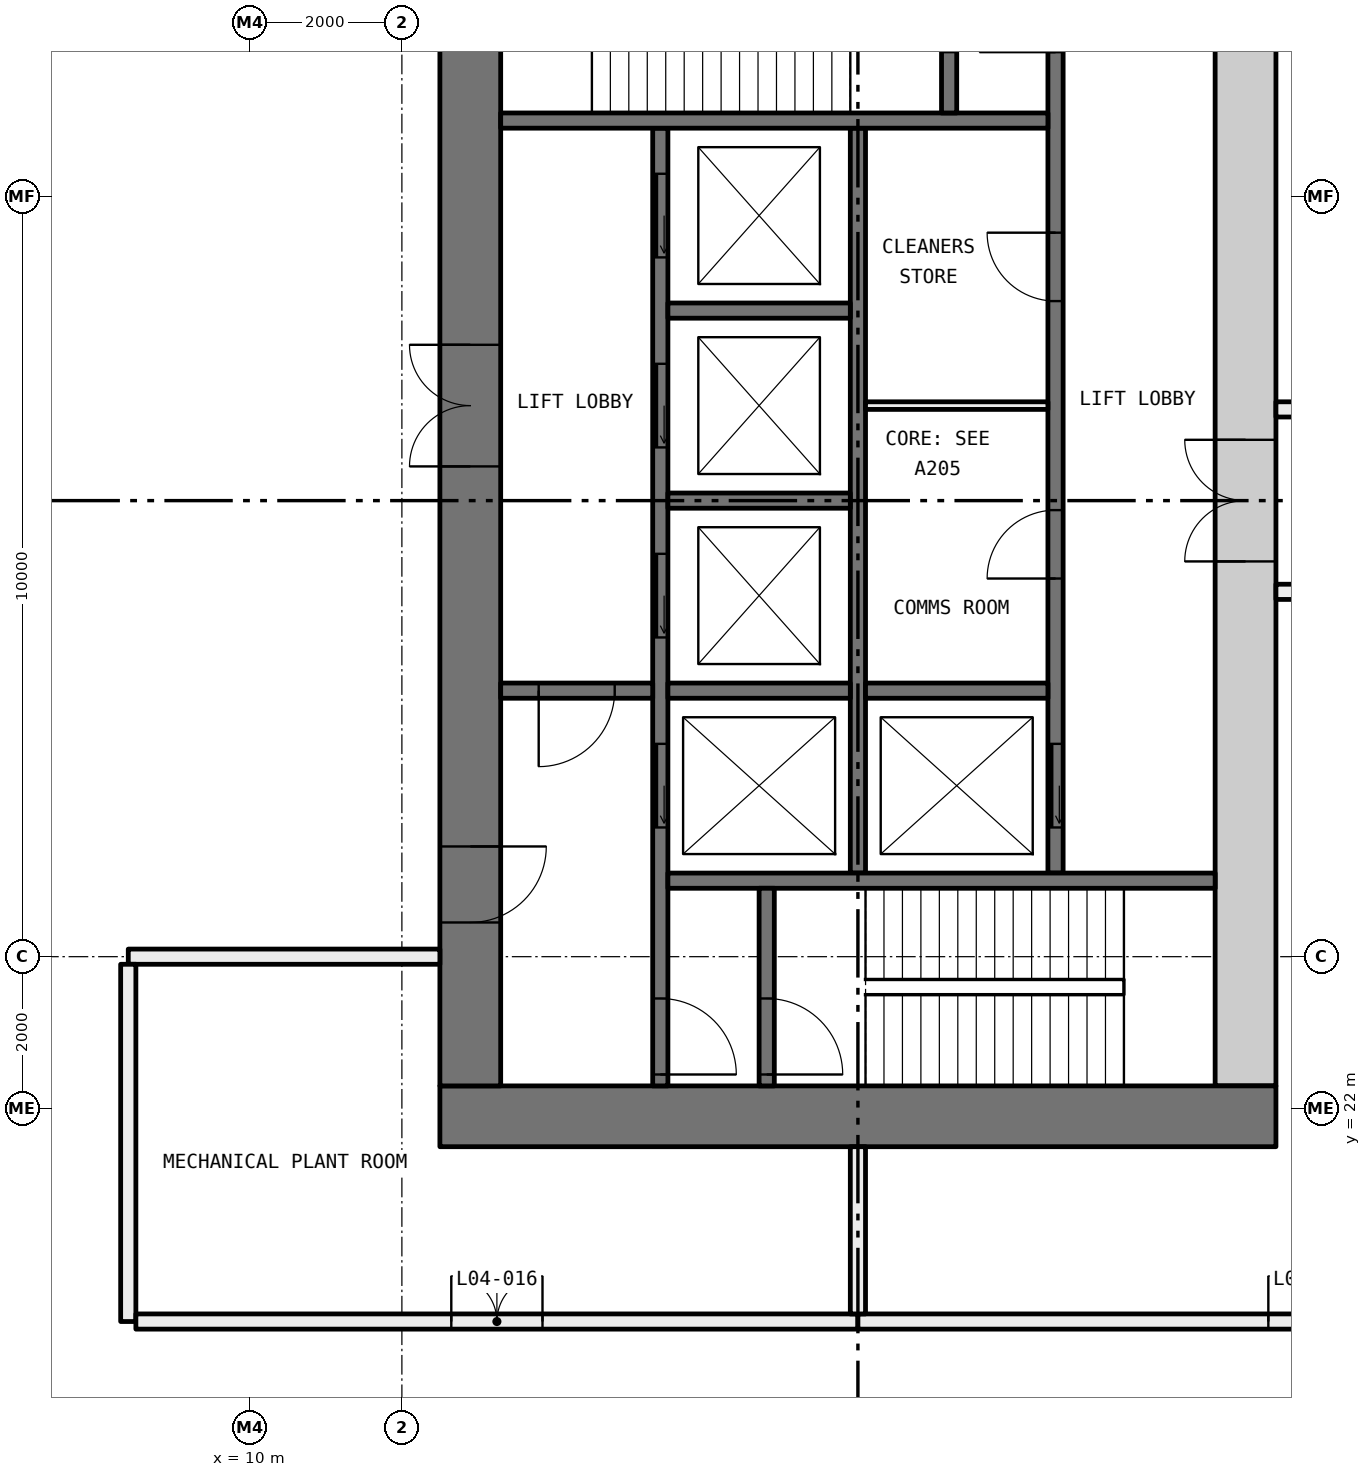
"""IFC4 building model, lengths in metres.
Left out: names, types, materials, properties, quantities, classifications, styles, units other than length and angle.
Written with IfcOpenShell. Run it as: python <this file> out.ifc"""

import sys

from ifc_helpers import new_model, si_unit, direction, frame, frame_2d, origin, place, context, subcontext, project, spatial, rectangle, extrude, element, fill, save


model = new_model("IFC4")
c1 = context("Model", 3, precision=1e-05, world=origin(), true_north=direction((0.0, 1.0)))
c2 = subcontext(c1, "Body", "Model", "MODEL_VIEW")
j1 = project(units=[si_unit("LENGTHUNIT", "METRE"), si_unit("PLANEANGLEUNIT", "RADIAN")], contexts=[c1])
p1 = place(None, origin())
s1 = spatial("IfcSite", under=j1, at=p1, CompositionType="ELEMENT")
p2 = place(p1, origin())
s2 = spatial("IfcBuilding", under=s1, at=p2, CompositionType="ELEMENT")
p3 = place(p2, frame((0.0, 0.0, 24.0)))
s3 = spatial("IfcBuildingStorey", under=s2, at=p3, CompositionType="ELEMENT", Elevation=24.0)
p4 = place(p3, frame((12.5, 24.0, 0.0), z_axis=(0.0, 0.0, 1.0), x_axis=(-1.0, 0.0, 0.0)))
e1 = element("IfcWall", 1, at=p4, inside=s3, PredefinedType="PARTITIONING", context=c2, shape_type="SweptSolid", body=[
    extrude(rectangle(XDim=4.1, YDim=0.2, at=frame_2d((2.05, 0.0))), origin(), (0.0, 0.0, 1.0), 5.0),
])
p5 = place(p3, frame((8.4, 23.9, 0.0), z_axis=(0.0, 0.0, 1.0), x_axis=(0.0, -1.0, 0.0)))
e2 = element("IfcWall", 2, at=p5, inside=s3, PredefinedType="PARTITIONING", context=c2, shape_type="SweptSolid", body=[
    extrude(rectangle(XDim=4.7, YDim=0.2, at=frame_2d((2.35, 0.0))), origin(), (0.0, 0.0, 1.0), 5.6),
])
p6 = place(p3, frame((8.5, 19.2, 0.0), z_axis=(0.0, 0.0, 1.0), x_axis=(1.0, 0.0, 0.0)))
e3 = element("IfcWall", 3, at=p6, inside=s3, PredefinedType="PARTITIONING", context=c2, shape_type="SweptSolid", body=[
    extrude(rectangle(XDim=9.5, YDim=0.2, at=frame_2d((4.75, 0.0))), origin(), (0.0, 0.0, 1.0), 5.6),
])
p7 = place(p6, frame((4.15, 0.0, 0.0)))
e4 = element("IfcOpeningElement", 4, at=p7, cuts=e3, PredefinedType="OPENING", context=c2, shape_type="SweptSolid", body=[
    extrude(rectangle(XDim=1.2, YDim=2.1, at=frame_2d((0.6, 1.05))), frame((0.0, 0.11, 0.0), z_axis=(0.0, -1.0, 0.0), x_axis=(1.0, 0.0, 0.0)), (0.0, 0.0, 1.0), 0.22),
])
p8 = place(p3, frame((18.0, 19.2, 0.0), z_axis=(0.0, 0.0, 1.0), x_axis=(1.0, 0.0, 0.0)))
e5 = element("IfcWall", 5, at=p8, inside=s3, PredefinedType="PARTITIONING", context=c2, shape_type="SweptSolid", body=[
    extrude(rectangle(XDim=12.0, YDim=0.2, at=frame_2d((6.0, 0.0))), origin(), (0.0, 0.0, 1.0), 5.6),
])
p9 = place(p8, frame((5.4, 0.0, 0.0)))
e6 = element("IfcOpeningElement", 6, at=p9, cuts=e5, PredefinedType="OPENING", context=c2, shape_type="SweptSolid", body=[
    extrude(rectangle(XDim=1.2, YDim=2.1, at=frame_2d((0.6, 1.05))), frame((0.0, 0.11, 0.0), z_axis=(0.0, -1.0, 0.0), x_axis=(1.0, 0.0, 0.0)), (0.0, 0.0, 1.0), 0.22),
])
p10 = place(p3, frame((23.5, 28.8, 0.0), z_axis=(0.0, 0.0, 1.0), x_axis=(1.0, 0.0, 0.0)))
e7 = element("IfcWall", 7, at=p10, inside=s3, PredefinedType="PARTITIONING", context=c2, shape_type="SweptSolid", body=[
    extrude(rectangle(XDim=6.5, YDim=0.2, at=frame_2d((3.25, 0.0))), origin(), (0.0, 0.0, 1.0), 5.6),
])
p11 = place(p10, frame((2.65, 0.0, 0.0)))
e8 = element("IfcOpeningElement", 8, at=p11, cuts=e7, PredefinedType="OPENING", context=c2, shape_type="SweptSolid", body=[
    extrude(rectangle(XDim=1.2, YDim=2.1, at=frame_2d((0.6, 1.05))), frame((0.0, 0.11, 0.0), z_axis=(0.0, -1.0, 0.0), x_axis=(1.0, 0.0, 0.0)), (0.0, 0.0, 1.0), 0.22),
])
p12 = place(p3, frame((30.0, 31.2, 0.0), z_axis=(0.0, 0.0, 1.0), x_axis=(-1.0, 0.0, 0.0)))
e9 = element("IfcWall", 9, at=p12, inside=s3, PredefinedType="PARTITIONING", context=c2, shape_type="SweptSolid", body=[
    extrude(rectangle(XDim=6.5, YDim=0.2, at=frame_2d((3.25, 0.0))), origin(), (0.0, 0.0, 1.0), 5.6),
])
p13 = place(p12, frame((2.65, 0.0, 0.0)))
e10 = element("IfcOpeningElement", 10, at=p13, cuts=e9, PredefinedType="OPENING", context=c2, shape_type="SweptSolid", body=[
    extrude(rectangle(XDim=1.2, YDim=2.1, at=frame_2d((0.6, 1.05))), frame((0.0, 0.11, 0.0), z_axis=(0.0, -1.0, 0.0), x_axis=(1.0, 0.0, 0.0)), (0.0, 0.0, 1.0), 0.22),
])
p14 = place(p3, frame((18.0, 19.3, 0.0), z_axis=(0.0, 0.0, 1.0), x_axis=(0.0, 1.0, 0.0)))
e11 = element("IfcWall", 11, at=p14, inside=s3, PredefinedType="PARTITIONING", context=c2, shape_type="SweptSolid", body=[
    extrude(rectangle(XDim=2.2, YDim=0.2, at=frame_2d((1.1, 0.0))), origin(), (0.0, 0.0, 1.0), 5.6),
])
p15 = place(p3, frame((12.5, 21.9, 0.0), z_axis=(0.0, 0.0, 1.0), x_axis=(1.0, 0.0, 0.0)))
e12 = element("IfcWall", 12, at=p15, inside=s3, PredefinedType="SHEAR", context=c2, shape_type="SweptSolid", body=[
    extrude(rectangle(XDim=11.0, YDim=0.8, at=frame_2d((5.5, 0.0))), origin(), (0.0, 0.0, 1.0), 5.6),
])
p16 = place(p3, frame((12.9, 22.3, 0.0), z_axis=(0.0, 0.0, 1.0), x_axis=(0.0, 1.0, 0.0)))
e13 = element("IfcWall", 13, at=p16, inside=s3, PredefinedType="SHEAR", context=c2, shape_type="SweptSolid", body=[
    extrude(rectangle(XDim=15.4, YDim=0.8, at=frame_2d((7.7, 0.0))), origin(), (0.0, 0.0, 1.0), 5.6),
])
p17 = place(p16, frame((8.15, 0.0, 0.0)))
e14 = element("IfcOpeningElement", 14, at=p17, cuts=e13, PredefinedType="OPENING", context=c2, shape_type="SweptSolid", body=[
    extrude(rectangle(XDim=1.6, YDim=2.1, at=frame_2d((0.8, 1.05))), frame((0.0, 0.41, 0.0), z_axis=(0.0, -1.0, 0.0), x_axis=(1.0, 0.0, 0.0)), (0.0, 0.0, 1.0), 0.82),
])
p18 = place(p16, frame((2.15, 0.0, 0.0)))
e15 = element("IfcOpeningElement", 15, at=p18, cuts=e13, PredefinedType="OPENING", context=c2, shape_type="SweptSolid", body=[
    extrude(rectangle(XDim=1.0, YDim=2.1, at=frame_2d((0.5, 1.05))), frame((0.0, 0.41, 0.0), z_axis=(0.0, -1.0, 0.0), x_axis=(1.0, 0.0, 0.0)), (0.0, 0.0, 1.0), 0.82),
])
p19 = place(p3, frame((23.1, 22.3, 0.0), z_axis=(0.0, 0.0, 1.0), x_axis=(0.0, 1.0, 0.0)))
e16 = element("IfcWall", 16, at=p19, inside=s3, PredefinedType="SHEAR", context=c2, shape_type="SweptSolid", body=[
    extrude(rectangle(XDim=15.4, YDim=0.8, at=frame_2d((7.7, 0.0))), origin(), (0.0, 0.0, 1.0), 5.6),
])
p20 = place(p19, frame((6.9, 0.0, 0.0)))
e17 = element("IfcOpeningElement", 17, at=p20, cuts=e16, PredefinedType="OPENING", context=c2, shape_type="SweptSolid", body=[
    extrude(rectangle(XDim=1.6, YDim=2.1, at=frame_2d((0.8, 1.05))), frame((0.0, 0.41, 0.0), z_axis=(0.0, -1.0, 0.0), x_axis=(1.0, 0.0, 0.0)), (0.0, 0.0, 1.0), 0.82),
])
p21 = place(p3, frame((15.4, 22.3, 0.0), z_axis=(0.0, 0.0, 1.0), x_axis=(0.0, 1.0, 0.0)))
e18 = element("IfcWall", 18, at=p21, inside=s3, PredefinedType="SOLIDWALL", context=c2, shape_type="SweptSolid", body=[
    extrude(rectangle(XDim=12.6, YDim=0.2, at=frame_2d((6.3, 0.0))), origin(), (0.0, 0.0, 1.0), 5.6),
])
p22 = place(p21, frame((3.4, 0.0, 0.0)))
e19 = element("IfcOpeningElement", 19, at=p22, cuts=e18, PredefinedType="OPENING", context=c2, shape_type="SweptSolid", body=[
    extrude(rectangle(XDim=1.1, YDim=2.1, at=frame_2d((0.55, 1.05))), frame((0.0, 0.11, 0.0), z_axis=(0.0, -1.0, 0.0), x_axis=(1.0, 0.0, 0.0)), (0.0, 0.0, 1.0), 0.22),
])
p23 = place(p21, frame((5.9, 0.0, 0.0)))
e20 = element("IfcOpeningElement", 20, at=p23, cuts=e18, PredefinedType="OPENING", context=c2, shape_type="SweptSolid", body=[
    extrude(rectangle(XDim=1.1, YDim=2.1, at=frame_2d((0.55, 1.05))), frame((0.0, 0.11, 0.0), z_axis=(0.0, -1.0, 0.0), x_axis=(1.0, 0.0, 0.0)), (0.0, 0.0, 1.0), 0.22),
])
p24 = place(p21, frame((8.4, 0.0, 0.0)))
e21 = element("IfcOpeningElement", 21, at=p24, cuts=e18, PredefinedType="OPENING", context=c2, shape_type="SweptSolid", body=[
    extrude(rectangle(XDim=1.1, YDim=2.1, at=frame_2d((0.55, 1.05))), frame((0.0, 0.11, 0.0), z_axis=(0.0, -1.0, 0.0), x_axis=(1.0, 0.0, 0.0)), (0.0, 0.0, 1.0), 0.22),
])
p25 = place(p21, frame((10.9, 0.0, 0.0)))
e22 = element("IfcOpeningElement", 22, at=p25, cuts=e18, PredefinedType="OPENING", context=c2, shape_type="SweptSolid", body=[
    extrude(rectangle(XDim=1.1, YDim=2.1, at=frame_2d((0.55, 1.05))), frame((0.0, 0.11, 0.0), z_axis=(0.0, -1.0, 0.0), x_axis=(1.0, 0.0, 0.0)), (0.0, 0.0, 1.0), 0.22),
])
p26 = place(p21, frame((0.15, 0.0, 0.0)))
e23 = element("IfcOpeningElement", 23, at=p26, cuts=e18, PredefinedType="OPENING", context=c2, shape_type="SweptSolid", body=[
    extrude(rectangle(XDim=1.0, YDim=2.1, at=frame_2d((0.5, 1.05))), frame((0.0, 0.11, 0.0), z_axis=(0.0, -1.0, 0.0), x_axis=(1.0, 0.0, 0.0)), (0.0, 0.0, 1.0), 0.22),
])
p27 = place(p3, frame((20.6, 25.1, 0.0), z_axis=(0.0, 0.0, 1.0), x_axis=(0.0, 1.0, 0.0)))
e24 = element("IfcWall", 24, at=p27, inside=s3, PredefinedType="SOLIDWALL", context=c2, shape_type="SweptSolid", body=[
    extrude(rectangle(XDim=12.6, YDim=0.2, at=frame_2d((6.3, 0.0))), origin(), (0.0, 0.0, 1.0), 5.6),
])
p28 = place(p27, frame((0.6, 0.0, 0.0)))
e25 = element("IfcOpeningElement", 25, at=p28, cuts=e24, PredefinedType="OPENING", context=c2, shape_type="SweptSolid", body=[
    extrude(rectangle(XDim=1.1, YDim=2.1, at=frame_2d((0.55, 1.05))), frame((0.0, 0.11, 0.0), z_axis=(0.0, -1.0, 0.0), x_axis=(1.0, 0.0, 0.0)), (0.0, 0.0, 1.0), 0.22),
])
p29 = place(p27, frame((10.8, 0.0, 0.0)))
e26 = element("IfcOpeningElement", 26, at=p29, cuts=e24, PredefinedType="OPENING", context=c2, shape_type="SweptSolid", body=[
    extrude(rectangle(XDim=1.0, YDim=2.1, at=frame_2d((0.5, 1.05))), frame((0.0, 0.11, 0.0), z_axis=(0.0, -1.0, 0.0), x_axis=(1.0, 0.0, 0.0)), (0.0, 0.0, 1.0), 0.22),
])
p30 = place(p27, frame((3.875, 0.0, 0.0)))
e27 = element("IfcOpeningElement", 27, at=p30, cuts=e24, PredefinedType="OPENING", context=c2, shape_type="SweptSolid", body=[
    extrude(rectangle(XDim=0.9, YDim=2.1, at=frame_2d((0.45, 1.05))), frame((0.0, 0.11, 0.0), z_axis=(0.0, -1.0, 0.0), x_axis=(1.0, 0.0, 0.0)), (0.0, 0.0, 1.0), 0.22),
])
p31 = place(p27, frame((7.525, 0.0, 0.0)))
e28 = element("IfcOpeningElement", 28, at=p31, cuts=e24, PredefinedType="OPENING", context=c2, shape_type="SweptSolid", body=[
    extrude(rectangle(XDim=0.9, YDim=2.1, at=frame_2d((0.45, 1.05))), frame((0.0, 0.11, 0.0), z_axis=(0.0, -1.0, 0.0), x_axis=(1.0, 0.0, 0.0)), (0.0, 0.0, 1.0), 0.22),
])
p32 = place(p3, frame((18.0, 25.1, 0.0), z_axis=(0.0, 0.0, 1.0), x_axis=(0.0, 1.0, 0.0)))
e29 = element("IfcWall", 29, at=p32, inside=s3, PredefinedType="SOLIDWALL", context=c2, shape_type="SweptSolid", body=[
    extrude(rectangle(XDim=9.8, YDim=0.2, at=frame_2d((4.9, 0.0))), origin(), (0.0, 0.0, 1.0), 5.6),
])
for number, where, z_axis, x_axis in (
    (30, (15.5, 25.0, 0.0), (0.0, 0.0, 1.0), (1.0, 0.0, 0.0)),
    (31, (13.3, 35.0, 0.0), (0.0, 0.0, 1.0), (1.0, 0.0, 0.0)),
):
    element("IfcWall", number, at=place(p3, frame(where, z_axis=z_axis, x_axis=x_axis)), inside=s3, PredefinedType="SOLIDWALL", context=c2, shape_type="SweptSolid", body=[
        extrude(rectangle(XDim=7.2, YDim=0.2, at=frame_2d((3.6, 0.0))), origin(), (0.0, 0.0, 1.0), 5.6),
    ])
p33 = place(p3, frame((13.3, 27.5, 0.0), z_axis=(0.0, 0.0, 1.0), x_axis=(1.0, 0.0, 0.0)))
e32 = element("IfcWall", 32, at=p33, inside=s3, PredefinedType="SOLIDWALL", context=c2, shape_type="SweptSolid", body=[
    extrude(rectangle(XDim=2.0, YDim=0.2, at=frame_2d((1.0, 0.0))), origin(), (0.0, 0.0, 1.0), 5.6),
])
p34 = place(p33, frame((0.5, 0.0, 0.0)))
e33 = element("IfcOpeningElement", 33, at=p34, cuts=e32, PredefinedType="OPENING", context=c2, shape_type="SweptSolid", body=[
    extrude(rectangle(XDim=1.0, YDim=2.1, at=frame_2d((0.5, 1.05))), frame((0.0, 0.11, 0.0), z_axis=(0.0, -1.0, 0.0), x_axis=(1.0, 0.0, 0.0)), (0.0, 0.0, 1.0), 0.22),
])
p35 = place(p3, frame((16.8, 22.3, 0.0), z_axis=(0.0, 0.0, 1.0), x_axis=(0.0, 1.0, 0.0)))
e34 = element("IfcWall", 34, at=p35, inside=s3, PredefinedType="SOLIDWALL", context=c2, shape_type="SweptSolid", body=[
    extrude(rectangle(XDim=2.6, YDim=0.2, at=frame_2d((1.3, 0.0))), origin(), (0.0, 0.0, 1.0), 5.6),
])
p36 = place(p35, frame((0.15, 0.0, 0.0)))
e35 = element("IfcOpeningElement", 35, at=p36, cuts=e34, PredefinedType="OPENING", context=c2, shape_type="SweptSolid", body=[
    extrude(rectangle(XDim=1.0, YDim=2.1, at=frame_2d((0.5, 1.05))), frame((0.0, 0.11, 0.0), z_axis=(0.0, -1.0, 0.0), x_axis=(1.0, 0.0, 0.0)), (0.0, 0.0, 1.0), 0.22),
])
p37 = place(p3, frame((19.2, 35.1, 0.0), z_axis=(0.0, 0.0, 1.0), x_axis=(0.0, 1.0, 0.0)))
e36 = element("IfcWall", 36, at=p37, inside=s3, PredefinedType="SOLIDWALL", context=c2, shape_type="SweptSolid", body=[
    extrude(rectangle(XDim=2.6, YDim=0.2, at=frame_2d((1.3, 0.0))), origin(), (0.0, 0.0, 1.0), 5.6),
])
p38 = place(p37, frame((0.8, 0.0, 0.0)))
e37 = element("IfcOpeningElement", 37, at=p38, cuts=e36, PredefinedType="OPENING", context=c2, shape_type="SweptSolid", body=[
    extrude(rectangle(XDim=1.0, YDim=2.1, at=frame_2d((0.5, 1.05))), frame((0.0, 0.11, 0.0), z_axis=(0.0, -1.0, 0.0), x_axis=(1.0, 0.0, 0.0)), (0.0, 0.0, 1.0), 0.22),
])
for number, where, z_axis, x_axis in (
    (38, (15.5, 27.5, 0.0), (0.0, 0.0, 1.0), (1.0, 0.0, 0.0)),
    (39, (15.5, 30.0, 0.0), (0.0, 0.0, 1.0), (1.0, 0.0, 0.0)),
    (40, (15.5, 32.5, 0.0), (0.0, 0.0, 1.0), (1.0, 0.0, 0.0)),
    (41, (18.1, 27.5, 0.0), (0.0, 0.0, 1.0), (1.0, 0.0, 0.0)),
):
    element("IfcWall", number, at=place(p3, frame(where, z_axis=z_axis, x_axis=x_axis)), inside=s3, PredefinedType="SOLIDWALL", context=c2, shape_type="SweptSolid", body=[
        extrude(rectangle(XDim=2.4, YDim=0.2, at=frame_2d((1.2, 0.0))), origin(), (0.0, 0.0, 1.0), 5.6),
    ])
p39 = place(p3, frame((18.1, 31.25, 0.0), z_axis=(0.0, 0.0, 1.0), x_axis=(1.0, 0.0, 0.0)))
e42 = element("IfcWall", 42, at=p39, inside=s3, PredefinedType="PARTITIONING", context=c2, shape_type="SweptSolid", body=[
    extrude(rectangle(XDim=2.4, YDim=0.1, at=frame_2d((1.2, 0.0))), origin(), (0.0, 0.0, 1.0), 5.6),
])
p40 = place(p7, origin())
e43 = element("IfcDoor", 43, at=p40, inside=s3, OperationType="DOUBLE_DOOR_SINGLE_SWING", PredefinedType="DOOR", context=c2, shape_type="SweptSolid", body=[
    extrude(rectangle(XDim=1.2, YDim=2.1, at=frame_2d((0.6, 1.05))), frame((0.0, 0.025, 0.0), z_axis=(0.0, -1.0, 0.0), x_axis=(1.0, 0.0, 0.0)), (0.0, 0.0, 1.0), 0.05),
])
fill(e4, e43)
p41 = place(p9, origin())
e44 = element("IfcDoor", 44, at=p41, inside=s3, OperationType="DOUBLE_DOOR_SINGLE_SWING", PredefinedType="DOOR", context=c2, shape_type="SweptSolid", body=[
    extrude(rectangle(XDim=1.2, YDim=2.1, at=frame_2d((0.6, 1.05))), frame((0.0, 0.025, 0.0), z_axis=(0.0, -1.0, 0.0), x_axis=(1.0, 0.0, 0.0)), (0.0, 0.0, 1.0), 0.05),
])
fill(e6, e44)
p42 = place(p28, origin())
e45 = element("IfcDoor", 45, at=p42, inside=s3, OperationType="SLIDING_TO_LEFT", PredefinedType="DOOR", context=c2, shape_type="SweptSolid", body=[
    extrude(rectangle(XDim=1.1, YDim=2.1, at=frame_2d((0.55, 1.05))), frame((0.0, 0.025, 0.0), z_axis=(0.0, -1.0, 0.0), x_axis=(1.0, 0.0, 0.0)), (0.0, 0.0, 1.0), 0.05),
])
fill(e25, e45)
p43 = place(p22, origin())
e46 = element("IfcDoor", 46, at=p43, inside=s3, OperationType="SLIDING_TO_LEFT", PredefinedType="DOOR", context=c2, shape_type="SweptSolid", body=[
    extrude(rectangle(XDim=1.1, YDim=2.1, at=frame_2d((0.55, 1.05))), frame((0.0, 0.025, 0.0), z_axis=(0.0, -1.0, 0.0), x_axis=(1.0, 0.0, 0.0)), (0.0, 0.0, 1.0), 0.05),
])
fill(e19, e46)
p44 = place(p23, origin())
e47 = element("IfcDoor", 47, at=p44, inside=s3, OperationType="SLIDING_TO_LEFT", PredefinedType="DOOR", context=c2, shape_type="SweptSolid", body=[
    extrude(rectangle(XDim=1.1, YDim=2.1, at=frame_2d((0.55, 1.05))), frame((0.0, 0.025, 0.0), z_axis=(0.0, -1.0, 0.0), x_axis=(1.0, 0.0, 0.0)), (0.0, 0.0, 1.0), 0.05),
])
fill(e20, e47)
p45 = place(p24, origin())
e48 = element("IfcDoor", 48, at=p45, inside=s3, OperationType="SLIDING_TO_LEFT", PredefinedType="DOOR", context=c2, shape_type="SweptSolid", body=[
    extrude(rectangle(XDim=1.1, YDim=2.1, at=frame_2d((0.55, 1.05))), frame((0.0, 0.025, 0.0), z_axis=(0.0, -1.0, 0.0), x_axis=(1.0, 0.0, 0.0)), (0.0, 0.0, 1.0), 0.05),
])
fill(e21, e48)
p46 = place(p25, origin())
e49 = element("IfcDoor", 49, at=p46, inside=s3, OperationType="SLIDING_TO_LEFT", PredefinedType="DOOR", context=c2, shape_type="SweptSolid", body=[
    extrude(rectangle(XDim=1.1, YDim=2.1, at=frame_2d((0.55, 1.05))), frame((0.0, 0.025, 0.0), z_axis=(0.0, -1.0, 0.0), x_axis=(1.0, 0.0, 0.0)), (0.0, 0.0, 1.0), 0.05),
])
fill(e22, e49)
p47 = place(p36, frame((1.0, 0.0, 0.0), x_axis=(-1.0, 0.0, 0.0)))
e50 = element("IfcDoor", 50, at=p47, inside=s3, OperationType="SINGLE_SWING_LEFT", PredefinedType="DOOR", context=c2, shape_type="SweptSolid", body=[
    extrude(rectangle(XDim=1.0, YDim=2.1, at=frame_2d((0.5, 1.05))), frame((0.0, 0.025, 0.0), z_axis=(0.0, -1.0, 0.0), x_axis=(1.0, 0.0, 0.0)), (0.0, 0.0, 1.0), 0.05),
])
fill(e35, e50)
p48 = place(p26, frame((1.0, 0.0, 0.0), x_axis=(-1.0, 0.0, 0.0)))
e51 = element("IfcDoor", 51, at=p48, inside=s3, OperationType="SINGLE_SWING_LEFT", PredefinedType="DOOR", context=c2, shape_type="SweptSolid", body=[
    extrude(rectangle(XDim=1.0, YDim=2.1, at=frame_2d((0.5, 1.05))), frame((0.0, 0.025, 0.0), z_axis=(0.0, -1.0, 0.0), x_axis=(1.0, 0.0, 0.0)), (0.0, 0.0, 1.0), 0.05),
])
fill(e23, e51)
p49 = place(p34, frame((1.0, 0.0, 0.0), x_axis=(-1.0, 0.0, 0.0)))
e52 = element("IfcDoor", 52, at=p49, inside=s3, OperationType="SINGLE_SWING_LEFT", PredefinedType="DOOR", context=c2, shape_type="SweptSolid", body=[
    extrude(rectangle(XDim=1.0, YDim=2.1, at=frame_2d((0.5, 1.05))), frame((0.0, 0.025, 0.0), z_axis=(0.0, -1.0, 0.0), x_axis=(1.0, 0.0, 0.0)), (0.0, 0.0, 1.0), 0.05),
])
fill(e33, e52)
p50 = place(p17, origin())
e53 = element("IfcDoor", 53, at=p50, inside=s3, OperationType="DOUBLE_DOOR_SINGLE_SWING", PredefinedType="DOOR", context=c2, shape_type="SweptSolid", body=[
    extrude(rectangle(XDim=1.6, YDim=2.1, at=frame_2d((0.8, 1.05))), frame((0.0, 0.025, 0.0), z_axis=(0.0, -1.0, 0.0), x_axis=(1.0, 0.0, 0.0)), (0.0, 0.0, 1.0), 0.05),
])
fill(e14, e53)
p51 = place(p18, frame((1.0, 0.0, 0.0), x_axis=(-1.0, 0.0, 0.0)))
e54 = element("IfcDoor", 54, at=p51, inside=s3, OperationType="SINGLE_SWING_RIGHT", PredefinedType="DOOR", context=c2, shape_type="SweptSolid", body=[
    extrude(rectangle(XDim=1.0, YDim=2.1, at=frame_2d((0.5, 1.05))), frame((0.0, 0.025, 0.0), z_axis=(0.0, -1.0, 0.0), x_axis=(1.0, 0.0, 0.0)), (0.0, 0.0, 1.0), 0.05),
])
fill(e15, e54)
p52 = place(p20, origin())
e55 = element("IfcDoor", 55, at=p52, inside=s3, OperationType="DOUBLE_DOOR_SINGLE_SWING", PredefinedType="DOOR", context=c2, shape_type="SweptSolid", body=[
    extrude(rectangle(XDim=1.6, YDim=2.1, at=frame_2d((0.8, 1.05))), frame((0.0, 0.025, 0.0), z_axis=(0.0, -1.0, 0.0), x_axis=(1.0, 0.0, 0.0)), (0.0, 0.0, 1.0), 0.05),
])
fill(e17, e55)
p53 = place(p30, origin())
e56 = element("IfcDoor", 56, at=p53, inside=s3, OperationType="SINGLE_SWING_RIGHT", PredefinedType="DOOR", context=c2, shape_type="SweptSolid", body=[
    extrude(rectangle(XDim=0.9, YDim=2.1, at=frame_2d((0.45, 1.05))), frame((0.0, 0.025, 0.0), z_axis=(0.0, -1.0, 0.0), x_axis=(1.0, 0.0, 0.0)), (0.0, 0.0, 1.0), 0.05),
])
fill(e27, e56)
p54 = place(p31, origin())
e57 = element("IfcDoor", 57, at=p54, inside=s3, OperationType="SINGLE_SWING_LEFT", PredefinedType="DOOR", context=c2, shape_type="SweptSolid", body=[
    extrude(rectangle(XDim=0.9, YDim=2.1, at=frame_2d((0.45, 1.05))), frame((0.0, 0.025, 0.0), z_axis=(0.0, -1.0, 0.0), x_axis=(1.0, 0.0, 0.0)), (0.0, 0.0, 1.0), 0.05),
])
fill(e28, e57)
save(model, sys.argv[1])
